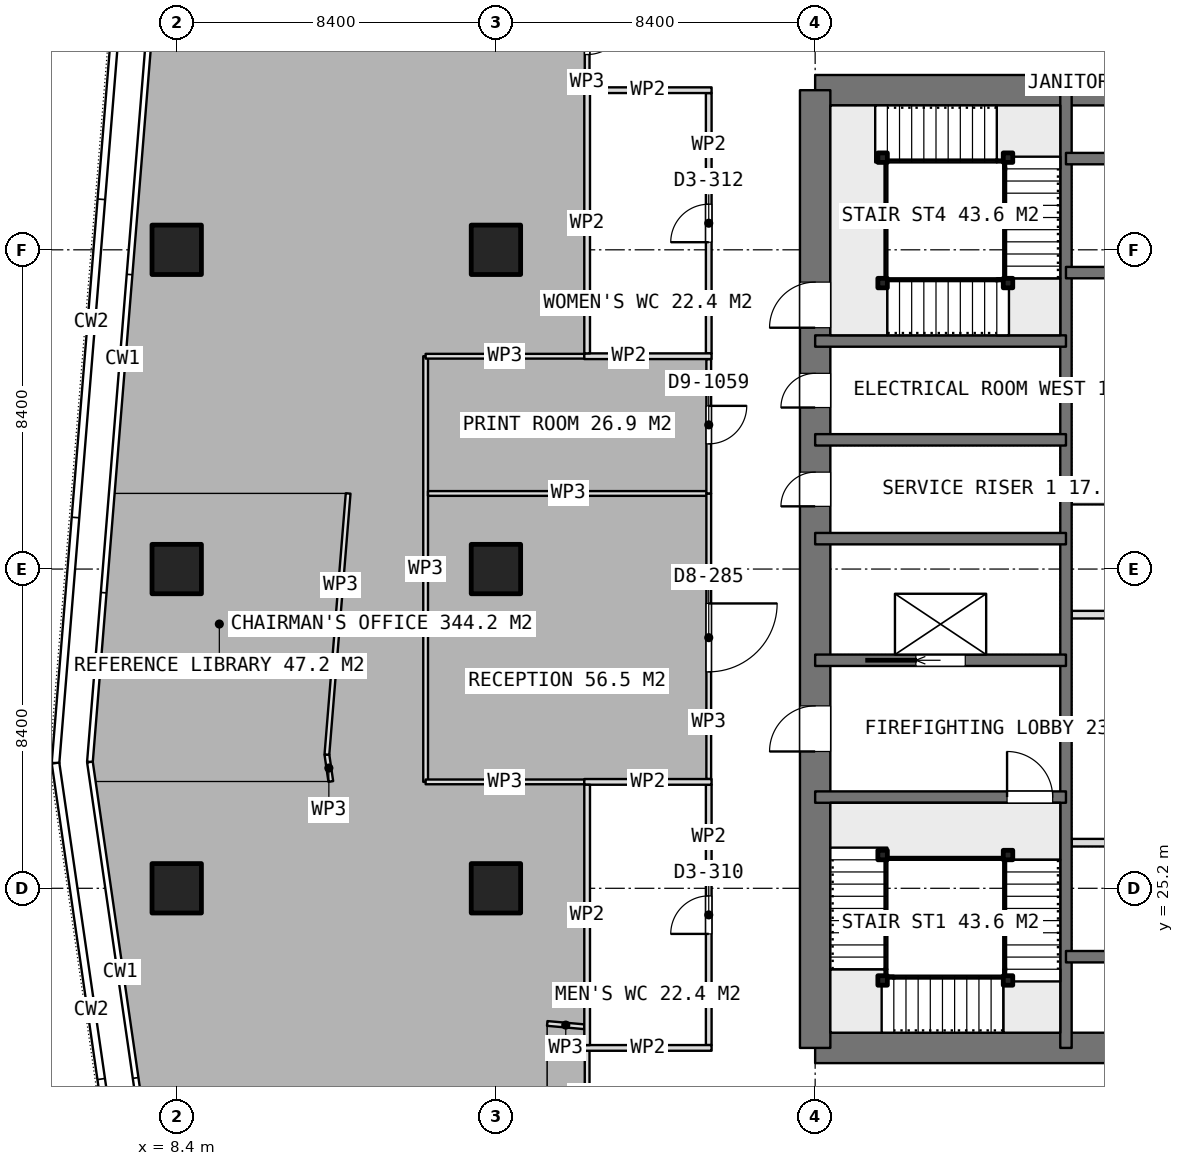
"""IFC4 building model, lengths in metres.
Left out: names, types, materials, properties, quantities, classifications, styles, units other than length and angle.
Written with IfcOpenShell. Run it as: python <this file> out.ifc"""

import sys

from ifc_helpers import new_model, si_unit, direction, frame, frame_2d, origin, origin_2d, place, context, subcontext, project, spatial, rectangle, extrude, element, fill, save


model = new_model("IFC4")
c1 = context("Model", 3, precision=1e-05, world=origin(), true_north=direction((0.0, 1.0)))
c2 = subcontext(c1, "Body", "Model", "MODEL_VIEW")
j1 = project(units=[si_unit("LENGTHUNIT", "METRE"), si_unit("PLANEANGLEUNIT", "RADIAN")], contexts=[c1])
p1 = place(None, origin())
s1 = spatial("IfcSite", under=j1, at=p1, CompositionType="ELEMENT")
p2 = place(p1, origin())
s2 = spatial("IfcBuilding", under=s1, at=p2, CompositionType="ELEMENT")
p3 = place(p2, frame((0.0, 0.0, 287.6)))
s3 = spatial("IfcBuildingStorey", under=s2, at=p3, CompositionType="ELEMENT", Elevation=287.6)
for number, where, z_axis, x_axis in (
    (1, (25.2, 21.0, 0.0), (0.0, 0.0, 1.0), (1.0, 0.0, 0.0)),
    (2, (25.2, 46.2, 0.0), (0.0, 0.0, 1.0), (1.0, 0.0, 0.0)),
):
    element("IfcWall", number, at=place(p3, frame(where, z_axis=z_axis, x_axis=x_axis)), inside=s3, PredefinedType="SHEAR", context=c2, shape_type="SweptSolid", body=[
        extrude(rectangle(XDim=10.4, YDim=0.8, at=frame_2d((5.2, 0.0))), origin(), (0.0, 0.0, 1.0), 3.75),
    ])
p4 = place(p3, frame((25.2, 21.0, 0.0), z_axis=(0.0, 0.0, 1.0), x_axis=(0.0, 1.0, 0.0)))
e3 = element("IfcWall", 3, at=p4, inside=s3, PredefinedType="SHEAR", context=c2, shape_type="SweptSolid", body=[
    extrude(rectangle(XDim=25.2, YDim=0.8, at=frame_2d((12.6, 0.0))), origin(), (0.0, 0.0, 1.0), 3.75),
])
p5 = place(p4, frame((7.8, 0.0, 0.0)))
e4 = element("IfcOpeningElement", 4, at=p5, cuts=e3, PredefinedType="OPENING", context=c2, shape_type="SweptSolid", body=[
    extrude(rectangle(XDim=1.2, YDim=2.1, at=frame_2d((0.6, 1.05))), frame((0.0, 0.41, 0.0), z_axis=(0.0, -1.0, 0.0), x_axis=(1.0, 0.0, 0.0)), (0.0, 0.0, 1.0), 0.82),
])
p6 = place(p4, frame((14.25, 0.0, 0.0)))
e5 = element("IfcOpeningElement", 5, at=p6, cuts=e3, PredefinedType="OPENING", context=c2, shape_type="SweptSolid", body=[
    extrude(rectangle(XDim=0.9, YDim=2.1, at=frame_2d((0.45, 1.05))), frame((0.0, 0.41, 0.0), z_axis=(0.0, -1.0, 0.0), x_axis=(1.0, 0.0, 0.0)), (0.0, 0.0, 1.0), 0.82),
])
p7 = place(p4, frame((16.85, 0.0, 0.0)))
e6 = element("IfcOpeningElement", 6, at=p7, cuts=e3, PredefinedType="OPENING", context=c2, shape_type="SweptSolid", body=[
    extrude(rectangle(XDim=0.9, YDim=2.1, at=frame_2d((0.45, 1.05))), frame((0.0, 0.41, 0.0), z_axis=(0.0, -1.0, 0.0), x_axis=(1.0, 0.0, 0.0)), (0.0, 0.0, 1.0), 0.82),
])
p8 = place(p4, frame((18.95, 0.0, 0.0)))
e7 = element("IfcOpeningElement", 7, at=p8, cuts=e3, PredefinedType="OPENING", context=c2, shape_type="SweptSolid", body=[
    extrude(rectangle(XDim=1.2, YDim=2.1, at=frame_2d((0.6, 1.05))), frame((0.0, 0.41, 0.0), z_axis=(0.0, -1.0, 0.0), x_axis=(1.0, 0.0, 0.0)), (0.0, 0.0, 1.0), 0.82),
])
p9 = place(p3, frame((31.8, 21.0, 0.0), z_axis=(0.0, 0.0, 1.0), x_axis=(0.0, 1.0, 0.0)))
e8 = element("IfcWall", 8, at=p9, inside=s3, PredefinedType="SHEAR", context=c2, shape_type="SweptSolid", body=[
    extrude(rectangle(XDim=25.2, YDim=0.3, at=frame_2d((12.6, 0.0))), origin(), (0.0, 0.0, 1.0), 3.75),
])
for number, where, z_axis, x_axis in (
    (9, (31.8, 23.4, 0.0), (0.0, 0.0, 1.0), (1.0, 0.0, 0.0)),
    (10, (31.8, 41.4, 0.0), (0.0, 0.0, 1.0), (1.0, 0.0, 0.0)),
    (11, (31.8, 44.4, 0.0), (0.0, 0.0, 1.0), (1.0, 0.0, 0.0)),
):
    element("IfcWall", number, at=place(p3, frame(where, z_axis=z_axis, x_axis=x_axis)), inside=s3, PredefinedType="SHEAR", context=c2, shape_type="SweptSolid", body=[
        extrude(rectangle(XDim=3.8, YDim=0.3, at=frame_2d((1.9, 0.0))), origin(), (0.0, 0.0, 1.0), 3.75),
    ])
p10 = place(p3, frame((25.2, 27.6, 0.0), z_axis=(0.0, 0.0, 1.0), x_axis=(1.0, 0.0, 0.0)))
e12 = element("IfcWall", 12, at=p10, inside=s3, PredefinedType="SHEAR", context=c2, shape_type="SweptSolid", body=[
    extrude(rectangle(XDim=6.6, YDim=0.3, at=frame_2d((3.3, 0.0))), origin(), (0.0, 0.0, 1.0), 3.75),
])
p11 = place(p10, frame((5.05, 0.0, 0.0)))
e13 = element("IfcOpeningElement", 13, at=p11, cuts=e12, PredefinedType="OPENING", context=c2, shape_type="SweptSolid", body=[
    extrude(rectangle(XDim=1.2, YDim=2.1, at=frame_2d((0.6, 1.05))), frame((0.0, 0.16, 0.0), z_axis=(0.0, -1.0, 0.0), x_axis=(1.0, 0.0, 0.0)), (0.0, 0.0, 1.0), 0.32),
])
p12 = place(p3, frame((25.2, 31.2, 0.0), z_axis=(0.0, 0.0, 1.0), x_axis=(1.0, 0.0, 0.0)))
e14 = element("IfcWall", 14, at=p12, inside=s3, PredefinedType="SHEAR", context=c2, shape_type="SweptSolid", body=[
    extrude(rectangle(XDim=6.6, YDim=0.3, at=frame_2d((3.3, 0.0))), origin(), (0.0, 0.0, 1.0), 3.75),
])
p13 = place(p12, frame((2.65, 0.0, 0.0)))
e15 = element("IfcOpeningElement", 15, at=p13, cuts=e14, PredefinedType="OPENING", context=c2, shape_type="SweptSolid", body=[
    extrude(rectangle(XDim=1.3, YDim=2.1, at=frame_2d((0.65, 1.05))), frame((0.0, 0.16, 0.0), z_axis=(0.0, -1.0, 0.0), x_axis=(1.0, 0.0, 0.0)), (0.0, 0.0, 1.0), 0.32),
])
for number, where, z_axis, x_axis in (
    (16, (25.2, 34.4, 0.0), (0.0, 0.0, 1.0), (1.0, 0.0, 0.0)),
    (17, (25.2, 37.0, 0.0), (0.0, 0.0, 1.0), (1.0, 0.0, 0.0)),
    (18, (25.2, 39.6, 0.0), (0.0, 0.0, 1.0), (1.0, 0.0, 0.0)),
):
    element("IfcWall", number, at=place(p3, frame(where, z_axis=z_axis, x_axis=x_axis)), inside=s3, PredefinedType="SHEAR", context=c2, shape_type="SweptSolid", body=[
        extrude(rectangle(XDim=6.6, YDim=0.3, at=frame_2d((3.3, 0.0))), origin(), (0.0, 0.0, 1.0), 3.75),
    ])
for number, where, z_axis, x_axis in (
    (19, (8.4, 25.2, 0.0), (0.0, 0.0, 1.0), (1.0, 0.0, 0.0)),
    (20, (8.4, 33.6, 0.0), (0.0, 0.0, 1.0), (1.0, 0.0, 0.0)),
    (21, (8.4, 42.0, 0.0), (0.0, 0.0, 1.0), (1.0, 0.0, 0.0)),
    (22, (16.8, 25.2, 0.0), (0.0, 0.0, 1.0), (1.0, 0.0, 0.0)),
    (23, (16.8, 33.6, 0.0), (0.0, 0.0, 1.0), (1.0, 0.0, 0.0)),
    (24, (16.8, 42.0, 0.0), (0.0, 0.0, 1.0), (1.0, 0.0, 0.0)),
):
    element("IfcColumn", number, at=place(p3, frame(where, z_axis=z_axis, x_axis=x_axis)), inside=s3, PredefinedType="COLUMN", context=c2, shape_type="SweptSolid", body=[
        extrude(rectangle(XDim=1.3, YDim=1.3, at=origin_2d()), origin(), (0.0, 0.0, 1.0), 3.75),
    ])
for number, where, z_axis, x_axis in (
    (25, (31.95, 26.4, 0.0), (0.0, 0.0, 1.0), (1.0, 0.0, 0.0)),
    (26, (31.95, 29.4, 0.0), (0.0, 0.0, 1.0), (1.0, 0.0, 0.0)),
    (27, (31.95, 32.4, 0.0), (0.0, 0.0, 1.0), (1.0, 0.0, 0.0)),
    (28, (31.95, 35.4, 0.0), (0.0, 0.0, 1.0), (1.0, 0.0, 0.0)),
    (29, (31.95, 38.4, 0.0), (0.0, 0.0, 1.0), (1.0, 0.0, 0.0)),
):
    element("IfcWall", number, at=place(p3, frame(where, z_axis=z_axis, x_axis=x_axis)), inside=s3, PredefinedType="PARTITIONING", context=c2, shape_type="SweptSolid", body=[
        extrude(rectangle(XDim=3.5, YDim=0.2, at=frame_2d((1.75, 0.0))), origin(), (0.0, 0.0, 1.0), 3.45),
    ])
for number, where, z_axis, x_axis in (
    (30, (19.125, 39.2, 0.0), (0.0, 0.0, 1.0), (1.0, 0.0, 0.0)),
    (31, (19.125, 46.2, 0.0), (0.0, 0.0, 1.0), (1.0, 0.0, 0.0)),
):
    element("IfcWall", number, at=place(p3, frame(where, z_axis=z_axis, x_axis=x_axis)), inside=s3, PredefinedType="PARTITIONING", context=c2, shape_type="SweptSolid", body=[
        extrude(rectangle(XDim=3.35, YDim=0.15, at=frame_2d((1.675, 0.0))), origin(), (0.0, 0.0, 1.0), 3.45),
    ])
p14 = place(p3, frame((19.2, 39.275, 0.0), z_axis=(0.0, 0.0, 1.0), x_axis=(0.0, 1.0, 0.0)))
e32 = element("IfcWall", 32, at=p14, inside=s3, PredefinedType="PARTITIONING", context=c2, shape_type="SweptSolid", body=[
    extrude(rectangle(XDim=6.85, YDim=0.15, at=frame_2d((3.425, 0.0))), origin(), (0.0, 0.0, 1.0), 3.45),
])
p15 = place(p3, frame((22.4, 39.275, 0.0), z_axis=(0.0, 0.0, 1.0), x_axis=(0.0, 1.0, 0.0)))
e33 = element("IfcWall", 33, at=p15, inside=s3, PredefinedType="PARTITIONING", context=c2, shape_type="SweptSolid", body=[
    extrude(rectangle(XDim=6.85, YDim=0.15, at=frame_2d((3.425, 0.0))), origin(), (0.0, 0.0, 1.0), 3.45),
])
p16 = place(p15, frame((2.925, 0.0, 0.0)))
e34 = element("IfcOpeningElement", 34, at=p16, cuts=e33, PredefinedType="OPENING", context=c2, shape_type="SweptSolid", body=[
    extrude(rectangle(XDim=1.0, YDim=2.1, at=frame_2d((0.5, 1.05))), frame((0.0, 0.085, 0.0), z_axis=(0.0, -1.0, 0.0), x_axis=(1.0, 0.0, 0.0)), (0.0, 0.0, 1.0), 0.17),
])
for number, where, z_axis, x_axis in (
    (35, (19.125, 21.0, 0.0), (0.0, 0.0, 1.0), (1.0, 0.0, 0.0)),
    (36, (19.125, 28.0, 0.0), (0.0, 0.0, 1.0), (1.0, 0.0, 0.0)),
):
    element("IfcWall", number, at=place(p3, frame(where, z_axis=z_axis, x_axis=x_axis)), inside=s3, PredefinedType="PARTITIONING", context=c2, shape_type="SweptSolid", body=[
        extrude(rectangle(XDim=3.35, YDim=0.15, at=frame_2d((1.675, 0.0))), origin(), (0.0, 0.0, 1.0), 3.45),
    ])
p17 = place(p3, frame((19.2, 21.075, 0.0), z_axis=(0.0, 0.0, 1.0), x_axis=(0.0, 1.0, 0.0)))
e37 = element("IfcWall", 37, at=p17, inside=s3, PredefinedType="PARTITIONING", context=c2, shape_type="SweptSolid", body=[
    extrude(rectangle(XDim=6.85, YDim=0.15, at=frame_2d((3.425, 0.0))), origin(), (0.0, 0.0, 1.0), 3.45),
])
p18 = place(p3, frame((22.4, 21.075, 0.0), z_axis=(0.0, 0.0, 1.0), x_axis=(0.0, 1.0, 0.0)))
e38 = element("IfcWall", 38, at=p18, inside=s3, PredefinedType="PARTITIONING", context=c2, shape_type="SweptSolid", body=[
    extrude(rectangle(XDim=6.85, YDim=0.15, at=frame_2d((3.425, 0.0))), origin(), (0.0, 0.0, 1.0), 3.45),
])
p19 = place(p18, frame((2.925, 0.0, 0.0)))
e39 = element("IfcOpeningElement", 39, at=p19, cuts=e38, PredefinedType="OPENING", context=c2, shape_type="SweptSolid", body=[
    extrude(rectangle(XDim=1.0, YDim=2.1, at=frame_2d((0.5, 1.05))), frame((0.0, 0.085, 0.0), z_axis=(0.0, -1.0, 0.0), x_axis=(1.0, 0.0, 0.0)), (0.0, 0.0, 1.0), 0.17),
])
p20 = place(p3, frame((14.95, 39.2, 0.0), z_axis=(0.0, 0.0, 1.0), x_axis=(0.0, -1.0, 0.0)))
e40 = element("IfcWall", 40, at=p20, inside=s3, PredefinedType="PARTITIONING", context=c2, shape_type="SweptSolid", body=[
    extrude(rectangle(XDim=11.2, YDim=0.125, at=frame_2d((5.6, 0.0))), origin(), (0.0, 0.0, 1.0), 3.45),
])
p21 = place(p3, frame((14.95, 28.0, 0.0), z_axis=(0.0, 0.0, 1.0), x_axis=(1.0, 0.0, 0.0)))
e41 = element("IfcWall", 41, at=p21, inside=s3, PredefinedType="PARTITIONING", context=c2, shape_type="SweptSolid", body=[
    extrude(rectangle(XDim=4.174, YDim=0.125, at=frame_2d((2.087, 0.0))), origin(), (0.0, 0.0, 1.0), 3.45),
])
p22 = place(p3, frame((19.125, 21.557, 0.0), z_axis=(0.0, 0.0, 1.0), x_axis=(-0.996029022323, 0.089029133943, 0.0)))
e42 = element("IfcWall", 42, at=p22, inside=s3, PredefinedType="PARTITIONING", context=c2, shape_type="SweptSolid", body=[
    extrude(rectangle(XDim=0.979, YDim=0.125, at=frame_2d((0.49, 0.0))), origin(), (0.0, 0.0, 1.0), 3.45),
])
p23 = place(p3, frame((12.455, 28.011, 0.0), z_axis=(0.0, 0.0, 1.0), x_axis=(-0.144195365637, 0.989549239062, 0.0)))
e43 = element("IfcWall", 43, at=p23, inside=s3, PredefinedType="PARTITIONING", context=c2, shape_type="SweptSolid", body=[
    extrude(rectangle(XDim=0.715, YDim=0.125, at=frame_2d((0.357, 0.0))), origin(), (0.0, 0.0, 1.0), 3.45),
])
p24 = place(p3, frame((12.352, 28.718, 0.0), z_axis=(0.0, 0.0, 1.0), x_axis=(0.081064051258, 0.996708894108, 0.0)))
e44 = element("IfcWall", 44, at=p24, inside=s3, PredefinedType="PARTITIONING", context=c2, shape_type="SweptSolid", body=[
    extrude(rectangle(XDim=6.894, YDim=0.125, at=frame_2d((3.447, 0.0))), origin(), (0.0, 0.0, 1.0), 3.45),
])
p25 = place(p3, frame((19.2, 49.15, 0.0), z_axis=(0.0, 0.0, 1.0), x_axis=(0.0, -1.0, 0.0)))
e45 = element("IfcWall", 45, at=p25, inside=s3, PredefinedType="PARTITIONING", context=c2, shape_type="SweptSolid", body=[
    extrude(rectangle(XDim=3.025, YDim=0.125, at=frame_2d((1.512, 0.0))), origin(), (0.0, 0.0, 1.0), 3.45),
])
p26 = place(p25, frame((1.012, 0.0, 0.0)))
e46 = element("IfcOpeningElement", 46, at=p26, cuts=e45, PredefinedType="OPENING", context=c2, shape_type="SweptSolid", body=[
    extrude(rectangle(XDim=1.0, YDim=2.1, at=frame_2d((0.5, 1.05))), frame((0.0, 0.073, 0.0), z_axis=(0.0, -1.0, 0.0), x_axis=(1.0, 0.0, 0.0)), (0.0, 0.0, 1.0), 0.145),
])
p27 = place(p3, frame((19.124, 39.2, 0.0), z_axis=(0.0, 0.0, 1.0), x_axis=(-1.0, 0.0, 0.0)))
e47 = element("IfcWall", 47, at=p27, inside=s3, PredefinedType="PARTITIONING", context=c2, shape_type="SweptSolid", body=[
    extrude(rectangle(XDim=4.174, YDim=0.125, at=frame_2d((2.087, 0.0))), origin(), (0.0, 0.0, 1.0), 3.45),
])
p28 = place(p3, frame((19.2, 21.075, 0.0), z_axis=(0.0, 0.0, 1.0), x_axis=(0.0, -1.0, 0.0)))
e48 = element("IfcWall", 48, at=p28, inside=s3, PredefinedType="PARTITIONING", context=c2, shape_type="SweptSolid", body=[
    extrude(rectangle(XDim=2.675, YDim=0.125, at=frame_2d((1.337, 0.0))), origin(), (0.0, 0.0, 1.0), 3.45),
])
p29 = place(p3, frame((15.012, 35.589, 0.0), z_axis=(0.0, 0.0, 1.0), x_axis=(1.0, 0.0, 0.0)))
e49 = element("IfcWall", 49, at=p29, inside=s3, PredefinedType="PARTITIONING", context=c2, shape_type="SweptSolid", body=[
    extrude(rectangle(XDim=7.388, YDim=0.125, at=frame_2d((3.694, 0.0))), origin(), (0.0, 0.0, 1.0), 3.45),
])
p30 = place(p3, frame((22.4, 35.589, 0.0), z_axis=(0.0, 0.0, 1.0), x_axis=(0.0, -1.0, 0.0)))
e50 = element("IfcWall", 50, at=p30, inside=s3, PredefinedType="PARTITIONING", context=c2, shape_type="SweptSolid", body=[
    extrude(rectangle(XDim=7.514, YDim=0.125, at=frame_2d((3.757, 0.0))), origin(), (0.0, 0.0, 1.0), 3.45),
])
p31 = place(p30, frame((2.894, 0.0, 0.0)))
e51 = element("IfcOpeningElement", 51, at=p31, cuts=e50, PredefinedType="OPENING", context=c2, shape_type="SweptSolid", body=[
    extrude(rectangle(XDim=1.8, YDim=2.1, at=frame_2d((0.9, 1.05))), frame((0.0, 0.073, 0.0), z_axis=(0.0, -1.0, 0.0), x_axis=(1.0, 0.0, 0.0)), (0.0, 0.0, 1.0), 0.145),
])
p32 = place(p3, frame((22.4, 39.125, 0.0), z_axis=(0.0, 0.0, 1.0), x_axis=(0.0, -1.0, 0.0)))
e52 = element("IfcWall", 52, at=p32, inside=s3, PredefinedType="PARTITIONING", context=c2, shape_type="SweptSolid", body=[
    extrude(rectangle(XDim=3.536, YDim=0.125, at=frame_2d((1.768, 0.0))), origin(), (0.0, 0.0, 1.0), 3.45),
])
p33 = place(p32, frame((1.231, 0.0, 0.0)))
e53 = element("IfcOpeningElement", 53, at=p33, cuts=e52, PredefinedType="OPENING", context=c2, shape_type="SweptSolid", body=[
    extrude(rectangle(XDim=1.0, YDim=2.1, at=frame_2d((0.5, 1.05))), frame((0.0, 0.073, 0.0), z_axis=(0.0, -1.0, 0.0), x_axis=(1.0, 0.0, 0.0)), (0.0, 0.0, 1.0), 0.145),
])
for number, where, z_axis, x_axis in (
    (54, (30.275, 26.075, 0.0), (0.0, 0.0, 1.0), (1.0, 0.0, 0.0)),
    (55, (30.275, 22.775, 0.0), (0.0, 0.0, 1.0), (1.0, 0.0, 0.0)),
    (56, (26.975, 22.775, 0.0), (0.0, 0.0, 1.0), (1.0, 0.0, 0.0)),
    (57, (26.975, 26.075, 0.0), (0.0, 0.0, 1.0), (1.0, 0.0, 0.0)),
    (58, (26.975, 41.125, 0.0), (0.0, 0.0, 1.0), (1.0, 0.0, 0.0)),
    (59, (30.275, 41.125, 0.0), (0.0, 0.0, 1.0), (1.0, 0.0, 0.0)),
    (60, (30.275, 44.425, 0.0), (0.0, 0.0, 1.0), (1.0, 0.0, 0.0)),
    (61, (26.975, 44.425, 0.0), (0.0, 0.0, 1.0), (1.0, 0.0, 0.0)),
):
    element("IfcColumn", number, at=place(p3, frame(where, z_axis=z_axis, x_axis=x_axis)), inside=s3, PredefinedType="COLUMN", context=c2, shape_type="SweptSolid", body=[
        extrude(rectangle(XDim=0.25, YDim=0.25, at=origin_2d()), origin(), (0.0, 0.0, 1.0), 3.75),
    ])
p34 = place(p5, origin())
e62 = element("IfcDoor", 62, at=p34, inside=s3, OperationType="SINGLE_SWING_LEFT", PredefinedType="DOOR", context=c2, shape_type="SweptSolid", body=[
    extrude(rectangle(XDim=1.2, YDim=2.1, at=frame_2d((0.6, 1.05))), frame((0.0, 0.025, 0.0), z_axis=(0.0, -1.0, 0.0), x_axis=(1.0, 0.0, 0.0)), (0.0, 0.0, 1.0), 0.05),
])
fill(e4, e62)
p35 = place(p6, origin())
e63 = element("IfcDoor", 63, at=p35, inside=s3, OperationType="SINGLE_SWING_LEFT", PredefinedType="DOOR", context=c2, shape_type="SweptSolid", body=[
    extrude(rectangle(XDim=0.9, YDim=2.1, at=frame_2d((0.45, 1.05))), frame((0.0, 0.025, 0.0), z_axis=(0.0, -1.0, 0.0), x_axis=(1.0, 0.0, 0.0)), (0.0, 0.0, 1.0), 0.05),
])
fill(e5, e63)
p36 = place(p7, origin())
e64 = element("IfcDoor", 64, at=p36, inside=s3, OperationType="SINGLE_SWING_LEFT", PredefinedType="DOOR", context=c2, shape_type="SweptSolid", body=[
    extrude(rectangle(XDim=0.9, YDim=2.1, at=frame_2d((0.45, 1.05))), frame((0.0, 0.025, 0.0), z_axis=(0.0, -1.0, 0.0), x_axis=(1.0, 0.0, 0.0)), (0.0, 0.0, 1.0), 0.05),
])
fill(e6, e64)
p37 = place(p13, origin())
e65 = element("IfcDoor", 65, at=p37, inside=s3, OperationType="SLIDING_TO_LEFT", PredefinedType="USERDEFINED", context=c2, shape_type="SweptSolid", body=[
    extrude(rectangle(XDim=1.3, YDim=2.1, at=frame_2d((0.65, 1.05))), frame((0.0, 0.025, 0.0), z_axis=(0.0, -1.0, 0.0), x_axis=(1.0, 0.0, 0.0)), (0.0, 0.0, 1.0), 0.05),
])
fill(e15, e65)
p38 = place(p16, origin())
e66 = element("IfcDoor", 66, at=p38, inside=s3, OperationType="SINGLE_SWING_LEFT", PredefinedType="DOOR", context=c2, shape_type="SweptSolid", body=[
    extrude(rectangle(XDim=1.0, YDim=2.1, at=frame_2d((0.5, 1.05))), frame((0.0, 0.025, 0.0), z_axis=(0.0, -1.0, 0.0), x_axis=(1.0, 0.0, 0.0)), (0.0, 0.0, 1.0), 0.05),
])
fill(e34, e66)
p39 = place(p19, origin())
e67 = element("IfcDoor", 67, at=p39, inside=s3, OperationType="SINGLE_SWING_LEFT", PredefinedType="DOOR", context=c2, shape_type="SweptSolid", body=[
    extrude(rectangle(XDim=1.0, YDim=2.1, at=frame_2d((0.5, 1.05))), frame((0.0, 0.025, 0.0), z_axis=(0.0, -1.0, 0.0), x_axis=(1.0, 0.0, 0.0)), (0.0, 0.0, 1.0), 0.05),
])
fill(e39, e67)
p40 = place(p26, origin())
e68 = element("IfcDoor", 68, at=p40, inside=s3, OperationType="SINGLE_SWING_LEFT", PredefinedType="DOOR", context=c2, shape_type="SweptSolid", body=[
    extrude(rectangle(XDim=1.0, YDim=2.1, at=frame_2d((0.5, 1.05))), frame((0.0, 0.025, 0.0), z_axis=(0.0, -1.0, 0.0), x_axis=(1.0, 0.0, 0.0)), (0.0, 0.0, 1.0), 0.05),
])
fill(e46, e68)
p41 = place(p31, origin())
e69 = element("IfcDoor", 69, at=p41, inside=s3, OperationType="DOUBLE_DOOR_SINGLE_SWING", PredefinedType="DOOR", context=c2, shape_type="SweptSolid", body=[
    extrude(rectangle(XDim=1.8, YDim=2.1, at=frame_2d((0.9, 1.05))), frame((0.0, 0.025, 0.0), z_axis=(0.0, -1.0, 0.0), x_axis=(1.0, 0.0, 0.0)), (0.0, 0.0, 1.0), 0.05),
])
fill(e51, e69)
p42 = place(p33, origin())
e70 = element("IfcDoor", 70, at=p42, inside=s3, OperationType="SINGLE_SWING_LEFT", PredefinedType="DOOR", context=c2, shape_type="SweptSolid", body=[
    extrude(rectangle(XDim=1.0, YDim=2.1, at=frame_2d((0.5, 1.05))), frame((0.0, 0.025, 0.0), z_axis=(0.0, -1.0, 0.0), x_axis=(1.0, 0.0, 0.0)), (0.0, 0.0, 1.0), 0.05),
])
fill(e53, e70)
p43 = place(p11, origin())
e71 = element("IfcDoor", 71, at=p43, inside=s3, OperationType="SINGLE_SWING_RIGHT", PredefinedType="DOOR", context=c2, shape_type="SweptSolid", body=[
    extrude(rectangle(XDim=1.2, YDim=2.1, at=frame_2d((0.6, 1.05))), frame((0.0, 0.025, 0.0), z_axis=(0.0, -1.0, 0.0), x_axis=(1.0, 0.0, 0.0)), (0.0, 0.0, 1.0), 0.05),
])
fill(e13, e71)
p44 = place(p8, origin())
e72 = element("IfcDoor", 72, at=p44, inside=s3, OperationType="SINGLE_SWING_RIGHT", PredefinedType="DOOR", context=c2, shape_type="SweptSolid", body=[
    extrude(rectangle(XDim=1.2, YDim=2.1, at=frame_2d((0.6, 1.05))), frame((0.0, 0.025, 0.0), z_axis=(0.0, -1.0, 0.0), x_axis=(1.0, 0.0, 0.0)), (0.0, 0.0, 1.0), 0.05),
])
fill(e7, e72)
save(model, sys.argv[1])
